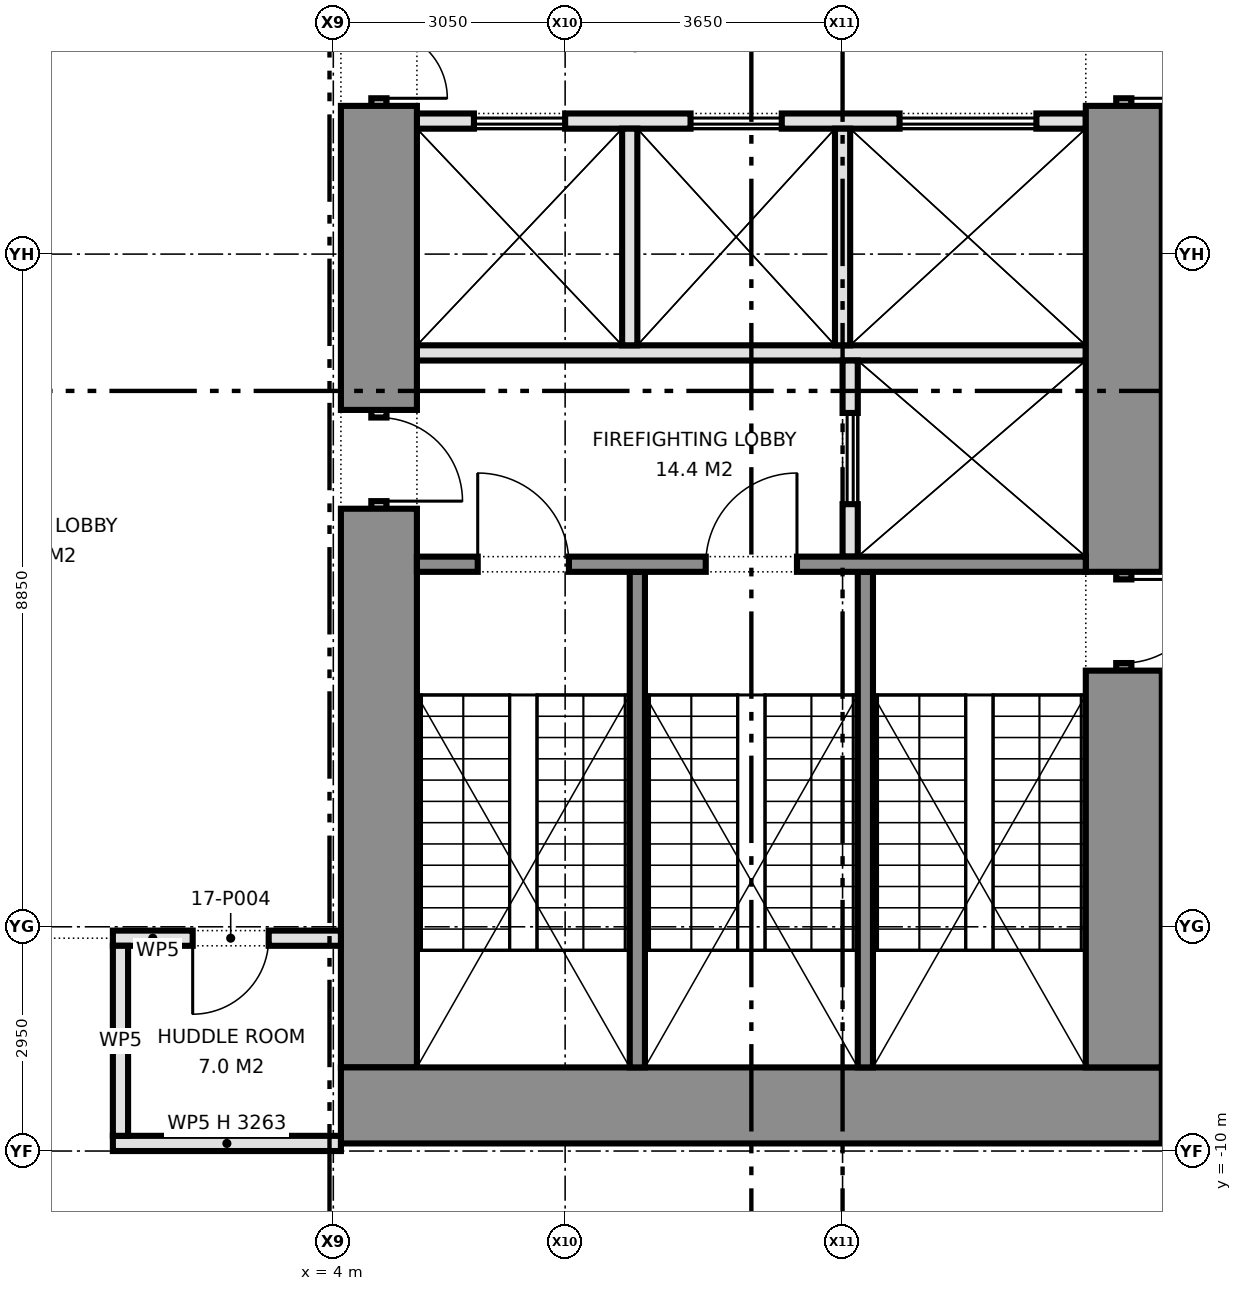
"""IFC4 building model, lengths in metres.
Left out: names, types, materials, properties, quantities, classifications, styles, units other than length and angle.
Written with IfcOpenShell. Run it as: python <this file> out.ifc"""

import sys

from ifc_helpers import new_model, si_unit, direction, frame, frame_2d, origin, place, context, subcontext, project, spatial, rectangle, extrude, element, fill, save


model = new_model("IFC4")
c1 = context("Model", 3, precision=1e-05, world=origin(), true_north=direction((0.0, 1.0)))
c2 = subcontext(c1, "Body", "Model", "MODEL_VIEW")
j1 = project(units=[si_unit("LENGTHUNIT", "METRE"), si_unit("PLANEANGLEUNIT", "RADIAN")], contexts=[c1])
p1 = place(None, origin())
s1 = spatial("IfcSite", under=j1, at=p1, CompositionType="ELEMENT")
p2 = place(p1, origin())
s2 = spatial("IfcBuilding", under=s1, at=p2, CompositionType="ELEMENT")
p3 = place(p2, frame((0.0, 0.0, 77.6)))
s3 = spatial("IfcBuildingStorey", under=s2, at=p3, CompositionType="ELEMENT", Elevation=77.6)
p4 = place(p3, frame((14.9, -9.4, 0.0), z_axis=(0.0, 0.0, 1.0), x_axis=(-1.0, 0.0, 0.0)))
e1 = element("IfcWall", 1, at=p4, inside=s3, PredefinedType="SHEAR", context=c2, shape_type="SweptSolid", body=[
    extrude(rectangle(XDim=10.8, YDim=1.0, at=frame_2d((5.4, 0.0))), origin(), (0.0, 0.0, 1.0), 4.2),
])
p5 = place(p3, frame((14.4, 5.75, 0.0), z_axis=(0.0, 0.0, 1.0), x_axis=(0.0, -1.0, 0.0)))
e2 = element("IfcWall", 2, at=p5, inside=s3, PredefinedType="PARTITIONING", context=c2, shape_type="SweptSolid", body=[
    extrude(rectangle(XDim=2.0, YDim=0.2, at=frame_2d((1.0, 0.0))), origin(), (0.0, 0.0, 1.0), 2.4),
])
p6 = place(p5, frame((0.1, 0.0, 0.0)))
e3 = element("IfcOpeningElement", 3, at=p6, cuts=e2, PredefinedType="OPENING", context=c2, shape_type="SweptSolid", body=[
    extrude(rectangle(XDim=1.8, YDim=2.1, at=frame_2d((0.9, 1.05))), frame((0.0, 0.11, 0.0), z_axis=(0.0, -1.0, 0.0), x_axis=(1.0, 0.0, 0.0)), (0.0, 0.0, 1.0), 0.22),
])
p7 = place(p3, frame((14.4, 3.75, 0.0), z_axis=(0.0, 0.0, 1.0), x_axis=(0.0, -1.0, 0.0)))
e4 = element("IfcWall", 4, at=p7, inside=s3, PredefinedType="SHEAR", context=c2, shape_type="SweptSolid", body=[
    extrude(rectangle(XDim=6.13, YDim=1.0, at=frame_2d((3.065, 0.0))), origin(), (0.0, 0.0, 1.0), 4.2),
])
p8 = place(p3, frame((14.4, -2.38, 0.0), z_axis=(0.0, 0.0, 1.0), x_axis=(0.0, -1.0, 0.0)))
e5 = element("IfcWall", 5, at=p8, inside=s3, PredefinedType="SHEAR", context=c2, shape_type="SweptSolid", body=[
    extrude(rectangle(XDim=1.3, YDim=0.2, at=frame_2d((0.65, 0.0))), origin(), (0.0, 0.0, 1.0), 2.4),
])
p9 = place(p8, frame((0.1, 0.0, 0.0)))
e6 = element("IfcOpeningElement", 6, at=p9, cuts=e5, PredefinedType="OPENING", context=c2, shape_type="SweptSolid", body=[
    extrude(rectangle(XDim=1.1, YDim=2.1, at=frame_2d((0.55, 1.05))), frame((0.0, 0.11, 0.0), z_axis=(0.0, -1.0, 0.0), x_axis=(1.0, 0.0, 0.0)), (0.0, 0.0, 1.0), 0.22),
])
p10 = place(p3, frame((14.4, -3.68, 0.0), z_axis=(0.0, 0.0, 1.0), x_axis=(0.0, -1.0, 0.0)))
e7 = element("IfcWall", 7, at=p10, inside=s3, PredefinedType="SHEAR", context=c2, shape_type="SweptSolid", body=[
    extrude(rectangle(XDim=5.22, YDim=1.0, at=frame_2d((2.61, 0.0))), origin(), (0.0, 0.0, 1.0), 4.2),
])
p11 = place(p3, frame((4.6, 5.75, 0.0), z_axis=(0.0, 0.0, 1.0), x_axis=(0.0, -1.0, 0.0)))
e8 = element("IfcWall", 8, at=p11, inside=s3, PredefinedType="PARTITIONING", context=c2, shape_type="SweptSolid", body=[
    extrude(rectangle(XDim=2.0, YDim=0.2, at=frame_2d((1.0, 0.0))), origin(), (0.0, 0.0, 1.0), 2.4),
])
p12 = place(p11, frame((0.1, 0.0, 0.0)))
e9 = element("IfcOpeningElement", 9, at=p12, cuts=e8, PredefinedType="OPENING", context=c2, shape_type="SweptSolid", body=[
    extrude(rectangle(XDim=1.8, YDim=2.1, at=frame_2d((0.9, 1.05))), frame((0.0, 0.11, 0.0), z_axis=(0.0, -1.0, 0.0), x_axis=(1.0, 0.0, 0.0)), (0.0, 0.0, 1.0), 0.22),
])
p13 = place(p3, frame((4.6, 3.75, 0.0), z_axis=(0.0, 0.0, 1.0), x_axis=(0.0, -1.0, 0.0)))
e10 = element("IfcWall", 10, at=p13, inside=s3, PredefinedType="SHEAR", context=c2, shape_type="SweptSolid", body=[
    extrude(rectangle(XDim=4.0, YDim=1.0, at=frame_2d((2.0, 0.0))), origin(), (0.0, 0.0, 1.0), 4.2),
])
p14 = place(p3, frame((4.6, -0.25, 0.0), z_axis=(0.0, 0.0, 1.0), x_axis=(0.0, -1.0, 0.0)))
e11 = element("IfcWall", 11, at=p14, inside=s3, PredefinedType="PARTITIONING", context=c2, shape_type="SweptSolid", body=[
    extrude(rectangle(XDim=1.3, YDim=0.2, at=frame_2d((0.65, 0.0))), origin(), (0.0, 0.0, 1.0), 2.4),
])
p15 = place(p14, frame((0.1, 0.0, 0.0)))
e12 = element("IfcOpeningElement", 12, at=p15, cuts=e11, PredefinedType="OPENING", context=c2, shape_type="SweptSolid", body=[
    extrude(rectangle(XDim=1.1, YDim=2.1, at=frame_2d((0.55, 1.05))), frame((0.0, 0.11, 0.0), z_axis=(0.0, -1.0, 0.0), x_axis=(1.0, 0.0, 0.0)), (0.0, 0.0, 1.0), 0.22),
])
p16 = place(p3, frame((4.6, -1.55, 0.0), z_axis=(0.0, 0.0, 1.0), x_axis=(0.0, -1.0, 0.0)))
e13 = element("IfcWall", 13, at=p16, inside=s3, PredefinedType="SHEAR", context=c2, shape_type="SweptSolid", body=[
    extrude(rectangle(XDim=7.35, YDim=1.0, at=frame_2d((3.675, 0.0))), origin(), (0.0, 0.0, 1.0), 4.2),
])
p17 = place(p3, frame((13.9, 3.55, 0.0), z_axis=(0.0, 0.0, 1.0), x_axis=(-1.0, 0.0, 0.0)))
e14 = element("IfcWall", 14, at=p17, inside=s3, PredefinedType="PARTITIONING", context=c2, shape_type="SweptSolid", body=[
    extrude(rectangle(XDim=8.8, YDim=0.2, at=frame_2d((4.4, 0.0))), origin(), (0.0, 0.0, 1.0), 4.2),
])
p18 = place(p17, frame((0.65, 0.0, 0.0)))
e15 = element("IfcOpeningElement", 15, at=p18, cuts=e14, PredefinedType="OPENING", context=c2, shape_type="SweptSolid", body=[
    extrude(rectangle(XDim=1.8, YDim=2.1, at=frame_2d((0.9, 1.05))), frame((0.0, 0.11, 0.0), z_axis=(0.0, -1.0, 0.0), x_axis=(1.0, 0.0, 0.0)), (0.0, 0.0, 1.0), 0.22),
])
p19 = place(p17, frame((4.0, 0.0, 0.0)))
e16 = element("IfcOpeningElement", 16, at=p19, cuts=e14, PredefinedType="OPENING", context=c2, shape_type="SweptSolid", body=[
    extrude(rectangle(XDim=1.2, YDim=2.1, at=frame_2d((0.6, 1.05))), frame((0.0, 0.11, 0.0), z_axis=(0.0, -1.0, 0.0), x_axis=(1.0, 0.0, 0.0)), (0.0, 0.0, 1.0), 0.22),
])
p20 = place(p17, frame((6.85, 0.0, 0.0)))
e17 = element("IfcOpeningElement", 17, at=p20, cuts=e14, PredefinedType="OPENING", context=c2, shape_type="SweptSolid", body=[
    extrude(rectangle(XDim=1.2, YDim=2.1, at=frame_2d((0.6, 1.05))), frame((0.0, 0.11, 0.0), z_axis=(0.0, -1.0, 0.0), x_axis=(1.0, 0.0, 0.0)), (0.0, 0.0, 1.0), 0.22),
])
p21 = place(p3, frame((13.9, 0.5, 0.0), z_axis=(0.0, 0.0, 1.0), x_axis=(-1.0, 0.0, 0.0)))
e18 = element("IfcWall", 18, at=p21, inside=s3, PredefinedType="PARTITIONING", context=c2, shape_type="SweptSolid", body=[
    extrude(rectangle(XDim=8.8, YDim=0.2, at=frame_2d((4.4, 0.0))), origin(), (0.0, 0.0, 1.0), 4.2),
])
p22 = place(p3, frame((10.8, 0.4, 0.0), z_axis=(0.0, 0.0, 1.0), x_axis=(0.0, -1.0, 0.0)))
e19 = element("IfcWall", 19, at=p22, inside=s3, PredefinedType="PARTITIONING", context=c2, shape_type="SweptSolid", body=[
    extrude(rectangle(XDim=2.58, YDim=0.2, at=frame_2d((1.29, 0.0))), origin(), (0.0, 0.0, 1.0), 4.2),
])
p23 = place(p22, frame((0.69, 0.0, 0.0)))
e20 = element("IfcOpeningElement", 20, at=p23, cuts=e19, PredefinedType="OPENING", context=c2, shape_type="SweptSolid", body=[
    extrude(rectangle(XDim=1.2, YDim=2.1, at=frame_2d((0.6, 1.05))), frame((0.0, 0.11, 0.0), z_axis=(0.0, -1.0, 0.0), x_axis=(1.0, 0.0, 0.0)), (0.0, 0.0, 1.0), 0.22),
])
p24 = place(p3, frame((13.9, -2.28, 0.0), z_axis=(0.0, 0.0, 1.0), x_axis=(-1.0, 0.0, 0.0)))
e21 = element("IfcWall", 21, at=p24, inside=s3, PredefinedType="SHEAR", context=c2, shape_type="SweptSolid", body=[
    extrude(rectangle(XDim=8.8, YDim=0.2, at=frame_2d((4.4, 0.0))), origin(), (0.0, 0.0, 1.0), 4.2),
])
p25 = place(p24, frame((3.8, 0.0, 0.0)))
e22 = element("IfcOpeningElement", 22, at=p25, cuts=e21, PredefinedType="OPENING", context=c2, shape_type="SweptSolid", body=[
    extrude(rectangle(XDim=1.2, YDim=2.1, at=frame_2d((0.6, 1.05))), frame((0.0, 0.11, 0.0), z_axis=(0.0, -1.0, 0.0), x_axis=(1.0, 0.0, 0.0)), (0.0, 0.0, 1.0), 0.22),
])
p26 = place(p24, frame((6.8, 0.0, 0.0)))
e23 = element("IfcOpeningElement", 23, at=p26, cuts=e21, PredefinedType="OPENING", context=c2, shape_type="SweptSolid", body=[
    extrude(rectangle(XDim=1.2, YDim=2.1, at=frame_2d((0.6, 1.05))), frame((0.0, 0.11, 0.0), z_axis=(0.0, -1.0, 0.0), x_axis=(1.0, 0.0, 0.0)), (0.0, 0.0, 1.0), 0.22),
])
for number, where, z_axis, x_axis in (
    (24, (11.0, -2.38, 0.0), (0.0, 0.0, 1.0), (0.0, -1.0, 0.0)),
    (25, (8.0, -2.38, 0.0), (0.0, 0.0, 1.0), (0.0, -1.0, 0.0)),
):
    element("IfcWall", number, at=place(p3, frame(where, z_axis=z_axis, x_axis=x_axis)), inside=s3, PredefinedType="SHEAR", context=c2, shape_type="SweptSolid", body=[
        extrude(rectangle(XDim=6.52, YDim=0.2, at=frame_2d((3.26, 0.0))), origin(), (0.0, 0.0, 1.0), 4.2),
    ])
for number, where, z_axis, x_axis in (
    (26, (10.7, 3.45, 0.0), (0.0, 0.0, 1.0), (0.0, -1.0, 0.0)),
    (27, (7.9, 3.45, 0.0), (0.0, 0.0, 1.0), (0.0, -1.0, 0.0)),
):
    element("IfcWall", number, at=place(p3, frame(where, z_axis=z_axis, x_axis=x_axis)), inside=s3, PredefinedType="PARTITIONING", context=c2, shape_type="SweptSolid", body=[
        extrude(rectangle(XDim=2.85, YDim=0.2, at=frame_2d((1.425, 0.0))), origin(), (0.0, 0.0, 1.0), 4.2),
    ])
p27 = place(p3, frame((1.1, -9.9, 0.0), z_axis=(0.0, 0.0, 1.0), x_axis=(1.0, 0.0, 0.0)))
e28 = element("IfcWall", 28, at=p27, inside=s3, PredefinedType="PARTITIONING", context=c2, shape_type="SweptSolid", body=[
    extrude(rectangle(XDim=3.0, YDim=0.2, at=frame_2d((1.5, 0.0))), origin(), (0.0, 0.0, 1.0), 3.263),
])
p28 = place(p3, frame((1.1, -7.2, 0.0), z_axis=(0.0, 0.0, 1.0), x_axis=(1.0, 0.0, 0.0)))
e29 = element("IfcWall", 29, at=p28, inside=s3, PredefinedType="PARTITIONING", context=c2, shape_type="SweptSolid", body=[
    extrude(rectangle(XDim=3.0, YDim=0.2, at=frame_2d((1.5, 0.0))), origin(), (0.0, 0.0, 1.0), 4.2),
])
p29 = place(p28, frame((1.05, 0.0, 0.0)))
e30 = element("IfcOpeningElement", 30, at=p29, cuts=e29, PredefinedType="OPENING", context=c2, shape_type="SweptSolid", body=[
    extrude(rectangle(XDim=1.0, YDim=2.1, at=frame_2d((0.5, 1.05))), frame((0.0, 0.11, 0.0), z_axis=(0.0, -1.0, 0.0), x_axis=(1.0, 0.0, 0.0)), (0.0, 0.0, 1.0), 0.22),
])
p30 = place(p3, frame((1.2, -9.8, 0.0), z_axis=(0.0, 0.0, 1.0), x_axis=(0.0, 1.0, 0.0)))
e31 = element("IfcWall", 31, at=p30, inside=s3, PredefinedType="PARTITIONING", context=c2, shape_type="SweptSolid", body=[
    extrude(rectangle(XDim=2.5, YDim=0.2, at=frame_2d((1.25, 0.0))), origin(), (0.0, 0.0, 1.0), 4.2),
])
p31 = place(p6, origin())
e32 = element("IfcDoor", 32, at=p31, inside=s3, OperationType="DOUBLE_DOOR_SINGLE_SWING", PredefinedType="DOOR", context=c2, shape_type="SweptSolid", body=[
    extrude(rectangle(XDim=1.8, YDim=2.1, at=frame_2d((0.9, 1.05))), frame((0.0, 0.025, 0.0), z_axis=(0.0, -1.0, 0.0), x_axis=(1.0, 0.0, 0.0)), (0.0, 0.0, 1.0), 0.05),
])
fill(e3, e32)
p32 = place(p9, origin())
e33 = element("IfcDoor", 33, at=p32, inside=s3, OperationType="SINGLE_SWING_LEFT", PredefinedType="DOOR", context=c2, shape_type="SweptSolid", body=[
    extrude(rectangle(XDim=1.1, YDim=2.1, at=frame_2d((0.55, 1.05))), frame((0.0, 0.025, 0.0), z_axis=(0.0, -1.0, 0.0), x_axis=(1.0, 0.0, 0.0)), (0.0, 0.0, 1.0), 0.05),
])
fill(e6, e33)
p33 = place(p12, origin())
e34 = element("IfcDoor", 34, at=p33, inside=s3, OperationType="DOUBLE_DOOR_SINGLE_SWING", PredefinedType="DOOR", context=c2, shape_type="SweptSolid", body=[
    extrude(rectangle(XDim=1.8, YDim=2.1, at=frame_2d((0.9, 1.05))), frame((0.0, 0.025, 0.0), z_axis=(0.0, -1.0, 0.0), x_axis=(1.0, 0.0, 0.0)), (0.0, 0.0, 1.0), 0.05),
])
fill(e9, e34)
p34 = place(p15, origin())
e35 = element("IfcDoor", 35, at=p34, inside=s3, OperationType="SINGLE_SWING_RIGHT", PredefinedType="DOOR", context=c2, shape_type="SweptSolid", body=[
    extrude(rectangle(XDim=1.1, YDim=2.1, at=frame_2d((0.55, 1.05))), frame((0.0, 0.025, 0.0), z_axis=(0.0, -1.0, 0.0), x_axis=(1.0, 0.0, 0.0)), (0.0, 0.0, 1.0), 0.05),
])
fill(e12, e35)
p35 = place(p18, origin())
e36 = element("IfcDoor", 36, at=p35, inside=s3, OperationType="DOUBLE_DOOR_SLIDING", PredefinedType="DOOR", context=c2, shape_type="SweptSolid", body=[
    extrude(rectangle(XDim=1.8, YDim=2.1, at=frame_2d((0.9, 1.05))), frame((0.0, 0.025, 0.0), z_axis=(0.0, -1.0, 0.0), x_axis=(1.0, 0.0, 0.0)), (0.0, 0.0, 1.0), 0.05),
])
fill(e15, e36)
p36 = place(p19, origin())
e37 = element("IfcDoor", 37, at=p36, inside=s3, OperationType="DOUBLE_DOOR_SLIDING", PredefinedType="DOOR", context=c2, shape_type="SweptSolid", body=[
    extrude(rectangle(XDim=1.2, YDim=2.1, at=frame_2d((0.6, 1.05))), frame((0.0, 0.025, 0.0), z_axis=(0.0, -1.0, 0.0), x_axis=(1.0, 0.0, 0.0)), (0.0, 0.0, 1.0), 0.05),
])
fill(e16, e37)
p37 = place(p20, origin())
e38 = element("IfcDoor", 38, at=p37, inside=s3, OperationType="DOUBLE_DOOR_SLIDING", PredefinedType="DOOR", context=c2, shape_type="SweptSolid", body=[
    extrude(rectangle(XDim=1.2, YDim=2.1, at=frame_2d((0.6, 1.05))), frame((0.0, 0.025, 0.0), z_axis=(0.0, -1.0, 0.0), x_axis=(1.0, 0.0, 0.0)), (0.0, 0.0, 1.0), 0.05),
])
fill(e17, e38)
p38 = place(p23, origin())
e39 = element("IfcDoor", 39, at=p38, inside=s3, OperationType="DOUBLE_DOOR_SLIDING", PredefinedType="DOOR", context=c2, shape_type="SweptSolid", body=[
    extrude(rectangle(XDim=1.2, YDim=2.1, at=frame_2d((0.6, 1.05))), frame((0.0, 0.025, 0.0), z_axis=(0.0, -1.0, 0.0), x_axis=(1.0, 0.0, 0.0)), (0.0, 0.0, 1.0), 0.05),
])
fill(e20, e39)
p39 = place(p25, frame((1.2, 0.0, 0.0), z_axis=(0.0, 0.0, 1.0), x_axis=(-1.0, 0.0, 0.0)))
e40 = element("IfcDoor", 40, at=p39, inside=s3, OperationType="SINGLE_SWING_RIGHT", PredefinedType="DOOR", context=c2, shape_type="SweptSolid", body=[
    extrude(rectangle(XDim=1.2, YDim=2.1, at=frame_2d((0.6, 1.05))), frame((0.0, 0.025, 0.0), z_axis=(0.0, -1.0, 0.0), x_axis=(1.0, 0.0, 0.0)), (0.0, 0.0, 1.0), 0.05),
])
fill(e22, e40)
p40 = place(p26, frame((1.2, 0.0, 0.0), z_axis=(0.0, 0.0, 1.0), x_axis=(-1.0, 0.0, 0.0)))
e41 = element("IfcDoor", 41, at=p40, inside=s3, OperationType="SINGLE_SWING_LEFT", PredefinedType="DOOR", context=c2, shape_type="SweptSolid", body=[
    extrude(rectangle(XDim=1.2, YDim=2.1, at=frame_2d((0.6, 1.05))), frame((0.0, 0.025, 0.0), z_axis=(0.0, -1.0, 0.0), x_axis=(1.0, 0.0, 0.0)), (0.0, 0.0, 1.0), 0.05),
])
fill(e23, e41)
p41 = place(p29, frame((1.0, 0.0, 0.0), z_axis=(0.0, 0.0, 1.0), x_axis=(-1.0, 0.0, 0.0)))
e42 = element("IfcDoor", 42, at=p41, inside=s3, OperationType="SINGLE_SWING_RIGHT", PredefinedType="DOOR", context=c2, shape_type="SweptSolid", body=[
    extrude(rectangle(XDim=1.0, YDim=2.1, at=frame_2d((0.5, 1.05))), frame((0.0, 0.025, 0.0), z_axis=(0.0, -1.0, 0.0), x_axis=(1.0, 0.0, 0.0)), (0.0, 0.0, 1.0), 0.05),
])
fill(e30, e42)
save(model, sys.argv[1])
